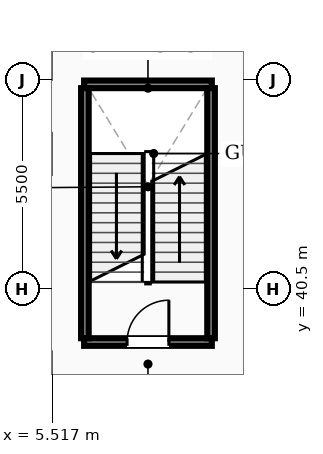
"""IFC4 building model, lengths in metres.
Left out: names, types, materials, properties, quantities, classifications, styles, units other than length and angle.
Written with IfcOpenShell. Run it as: python <this file> out.ifc"""

import sys

from ifc_helpers import new_model, si_unit, direction, frame, frame_2d, origin, place, context, subcontext, project, spatial, rectangle, extrude, element, fill, save


model = new_model("IFC4")
c1 = context("Model", 3, precision=1e-05, world=origin(), true_north=direction((0.0, 1.0)))
c2 = subcontext(c1, "Body", "Model", "MODEL_VIEW")
j1 = project(units=[si_unit("LENGTHUNIT", "METRE"), si_unit("PLANEANGLEUNIT", "RADIAN")], contexts=[c1])
p1 = place(None, origin())
s1 = spatial("IfcSite", under=j1, at=p1, CompositionType="ELEMENT")
p2 = place(p1, origin())
s2 = spatial("IfcBuilding", under=s1, at=p2, CompositionType="ELEMENT")
p3 = place(p2, frame((0.0, 0.0, -10.2)))
s3 = spatial("IfcBuildingStorey", under=s2, at=p3, CompositionType="ELEMENT", Elevation=-10.2)
p4 = place(p3, frame((6.36, 39.1, 0.0), z_axis=(0.0, 0.0, 1.0), x_axis=(1.0, 0.0, 0.0)))
e1 = element("IfcWall", 1, at=p4, inside=s3, PredefinedType="STANDARD", context=c2, shape_type="SweptSolid", body=[
    extrude(rectangle(XDim=3.36, YDim=0.2, at=frame_2d((1.68, 0.0))), origin(), (0.0, 0.0, 1.0), 4.92),
])
p5 = place(p4, frame((1.13, 0.0, 0.0)))
e2 = element("IfcOpeningElement", 2, at=p5, cuts=e1, PredefinedType="OPENING", context=c2, shape_type="SweptSolid", body=[
    extrude(rectangle(XDim=1.1, YDim=2.08, at=frame_2d((0.55, 1.04))), frame((0.0, 0.11, 0.0), z_axis=(0.0, -1.0, 0.0), x_axis=(1.0, 0.0, 0.0)), (0.0, 0.0, 1.0), 0.22),
])
p6 = place(p3, frame((6.36, 45.88, 0.0), z_axis=(0.0, 0.0, 1.0), x_axis=(1.0, 0.0, 0.0)))
e3 = element("IfcWall", 3, at=p6, inside=s3, PredefinedType="STANDARD", context=c2, shape_type="SweptSolid", body=[
    extrude(rectangle(XDim=3.36, YDim=0.2, at=frame_2d((1.68, 0.0))), origin(), (0.0, 0.0, 1.0), 4.92),
])
for number, where, z_axis, x_axis in (
    (4, (6.38, 39.2, 0.0), (0.0, 0.0, 1.0), (0.0, 1.0, 0.0)),
    (5, (9.7, 39.2, 0.0), (0.0, 0.0, 1.0), (0.0, 1.0, 0.0)),
):
    element("IfcWall", number, at=place(p3, frame(where, z_axis=z_axis, x_axis=x_axis)), inside=s3, PredefinedType="STANDARD", context=c2, shape_type="SweptSolid", body=[
        extrude(rectangle(XDim=6.58, YDim=0.2, at=frame_2d((3.29, 0.0))), origin(), (0.0, 0.0, 1.0), 4.92),
    ])
p7 = place(p5, origin())
e6 = element("IfcDoor", 6, at=p7, inside=s3, OperationType="SINGLE_SWING_RIGHT", PredefinedType="DOOR", context=c2, shape_type="SweptSolid", body=[
    extrude(rectangle(XDim=1.1, YDim=2.08, at=frame_2d((0.55, 1.04))), frame((0.0, 0.025, 0.0), z_axis=(0.0, -1.0, 0.0), x_axis=(1.0, 0.0, 0.0)), (0.0, 0.0, 1.0), 0.05),
])
fill(e2, e6)
save(model, sys.argv[1])
